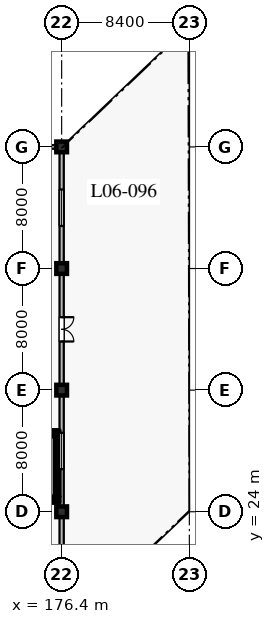
"""IFC4 building model, lengths in metres.
Left out: names, types, materials, properties, quantities, classifications, styles, units other than length and angle.
Written with IfcOpenShell. Run it as: python <this file> out.ifc"""

import sys

from ifc_helpers import new_model, si_unit, direction, frame, frame_2d, origin, origin_2d, place, context, subcontext, project, spatial, rectangle, hollow_rectangle, extrude, element, fill, save


model = new_model("IFC4")
c1 = context("Model", 3, precision=1e-05, world=origin(), true_north=direction((0.0, 1.0)))
c2 = subcontext(c1, "Body", "Model", "MODEL_VIEW")
j1 = project(units=[si_unit("LENGTHUNIT", "METRE"), si_unit("PLANEANGLEUNIT", "RADIAN")], contexts=[c1])
p1 = place(None, origin())
s1 = spatial("IfcSite", under=j1, at=p1, CompositionType="ELEMENT")
p2 = place(p1, origin())
s2 = spatial("IfcBuilding", under=s1, at=p2, CompositionType="ELEMENT")
p3 = place(p2, frame((0.0, 0.0, 28.8)))
s3 = spatial("IfcBuildingStorey", under=s2, at=p3, CompositionType="ELEMENT", Elevation=28.8)
for number, where, z_axis, x_axis in (
    (1, (176.4, 32.0, 0.0), (0.0, 0.0, 1.0), (1.0, 0.0, 0.0)),
    (2, (176.4, 48.0, 0.0), (0.0, 0.0, 1.0), (1.0, 0.0, 0.0)),
    (3, (176.4, 24.0, 0.0), (0.0, 0.0, 1.0), (1.0, 0.0, 0.0)),
    (4, (176.4, 40.0, 0.0), (0.0, 0.0, 1.0), (1.0, 0.0, 0.0)),
):
    element("IfcColumn", number, at=place(p3, frame(where, z_axis=z_axis, x_axis=x_axis)), inside=s3, PredefinedType="COLUMN", context=c2, shape_type="SweptSolid", body=[
        extrude(rectangle(XDim=0.7, YDim=0.7, at=origin_2d()), origin(), (0.0, 0.0, 1.0), 3.6),
    ])
p4 = place(p3, frame((168.35, 48.0, 0.0), z_axis=(0.0, 0.0, 1.0), x_axis=(1.0, 0.0, 0.0)))
e5 = element("IfcWall", 5, at=p4, inside=s3, PredefinedType="SOLIDWALL", context=c2, shape_type="SweptSolid", body=[
    extrude(rectangle(XDim=7.7, YDim=0.24, at=frame_2d((3.85, 0.0))), origin(), (0.0, 0.0, 1.0), 2.93),
])
p5 = place(p4, frame((0.97, 0.0, 0.8)))
e6 = element("IfcOpeningElement", 6, at=p5, cuts=e5, PredefinedType="OPENING", context=c2, shape_type="SweptSolid", body=[
    extrude(rectangle(XDim=2.0, YDim=1.75, at=frame_2d((1.0, 0.875))), frame((0.0, 0.13, 0.0), z_axis=(0.0, -1.0, 0.0), x_axis=(1.0, 0.0, 0.0)), (0.0, 0.0, 1.0), 0.26),
])
p6 = place(p4, frame((4.49, 0.0, 0.8)))
e7 = element("IfcOpeningElement", 7, at=p6, cuts=e5, PredefinedType="OPENING", context=c2, shape_type="SweptSolid", body=[
    extrude(rectangle(XDim=2.0, YDim=1.75, at=frame_2d((1.0, 0.875))), frame((0.0, 0.13, 0.0), z_axis=(0.0, -1.0, 0.0), x_axis=(1.0, 0.0, 0.0)), (0.0, 0.0, 1.0), 0.26),
])
p7 = place(p3, frame((176.4, 47.65, 0.0), z_axis=(0.0, 0.0, 1.0), x_axis=(0.0, -1.0, 0.0)))
e8 = element("IfcWall", 8, at=p7, inside=s3, PredefinedType="SOLIDWALL", context=c2, shape_type="SweptSolid", body=[
    extrude(rectangle(XDim=7.3, YDim=0.28, at=frame_2d((3.65, 0.0))), origin(), (0.0, 0.0, 1.0), 2.7),
])
p8 = place(p7, frame((2.45, 0.0, 0.5)))
e9 = element("IfcOpeningElement", 9, at=p8, cuts=e8, PredefinedType="OPENING", context=c2, shape_type="SweptSolid", body=[
    extrude(rectangle(XDim=2.4, YDim=1.65, at=frame_2d((1.2, 0.825))), frame((0.0, 0.15, 0.0), z_axis=(0.0, -1.0, 0.0), x_axis=(1.0, 0.0, 0.0)), (0.0, 0.0, 1.0), 0.3),
])
p9 = place(p3, frame((176.4, 39.65, 0.0), z_axis=(0.0, 0.0, 1.0), x_axis=(0.0, -1.0, 0.0)))
e10 = element("IfcWall", 10, at=p9, inside=s3, PredefinedType="SOLIDWALL", context=c2, shape_type="SweptSolid", body=[
    extrude(rectangle(XDim=7.3, YDim=0.28, at=frame_2d((3.65, 0.0))), origin(), (0.0, 0.0, 1.0), 2.7),
])
p10 = place(p9, frame((2.85, 0.0, 0.0)))
e11 = element("IfcOpeningElement", 11, at=p10, cuts=e10, PredefinedType="OPENING", context=c2, shape_type="SweptSolid", body=[
    extrude(rectangle(XDim=1.6, YDim=2.25, at=frame_2d((0.8, 1.125))), frame((0.0, 0.15, 0.0), z_axis=(0.0, -1.0, 0.0), x_axis=(1.0, 0.0, 0.0)), (0.0, 0.0, 1.0), 0.3),
])
p11 = place(p3, frame((176.4, 31.65, 0.0), z_axis=(0.0, 0.0, 1.0), x_axis=(0.0, -1.0, 0.0)))
e12 = element("IfcWall", 12, at=p11, inside=s3, PredefinedType="SOLIDWALL", context=c2, shape_type="SweptSolid", body=[
    extrude(rectangle(XDim=7.3, YDim=0.28, at=frame_2d((3.65, 0.0))), origin(), (0.0, 0.0, 1.0), 2.7),
])
p12 = place(p11, frame((2.45, 0.0, 0.5)))
e13 = element("IfcOpeningElement", 13, at=p12, cuts=e12, PredefinedType="OPENING", context=c2, shape_type="SweptSolid", body=[
    extrude(rectangle(XDim=2.4, YDim=1.65, at=frame_2d((1.2, 0.825))), frame((0.0, 0.15, 0.0), z_axis=(0.0, -1.0, 0.0), x_axis=(1.0, 0.0, 0.0)), (0.0, 0.0, 1.0), 0.3),
])
p13 = place(p3, frame((176.4, 23.65, 0.0), z_axis=(0.0, 0.0, 1.0), x_axis=(0.0, -1.0, 0.0)))
e14 = element("IfcWall", 14, at=p13, inside=s3, PredefinedType="SOLIDWALL", context=c2, shape_type="SweptSolid", body=[
    extrude(rectangle(XDim=7.3, YDim=0.28, at=frame_2d((3.65, 0.0))), origin(), (0.0, 0.0, 1.0), 2.7),
])
p14 = place(p13, frame((2.45, 0.0, 0.5)))
e15 = element("IfcOpeningElement", 15, at=p14, cuts=e14, PredefinedType="OPENING", context=c2, shape_type="SweptSolid", body=[
    extrude(rectangle(XDim=2.4, YDim=1.65, at=frame_2d((1.2, 0.825))), frame((0.0, 0.15, 0.0), z_axis=(0.0, -1.0, 0.0), x_axis=(1.0, 0.0, 0.0)), (0.0, 0.0, 1.0), 0.3),
])
p15 = place(p3, frame((168.1, 24.8, 0.0), z_axis=(0.0, 0.0, 1.0), x_axis=(1.0, 0.0, 0.0)))
e16 = element("IfcWall", 16, at=p15, inside=s3, PredefinedType="SHEAR", context=c2, shape_type="SweptSolid", body=[
    extrude(rectangle(XDim=8.15, YDim=0.4, at=frame_2d((4.075, 0.0))), origin(), (0.0, 0.0, 1.0), 3.365),
])
p16 = place(p3, frame((176.1, 25.005, 0.0), z_axis=(0.0, 0.0, 1.0), x_axis=(0.0, 1.0, 0.0)))
e17 = element("IfcWall", 17, at=p16, inside=s3, PredefinedType="SHEAR", context=c2, shape_type="SweptSolid", body=[
    extrude(rectangle(XDim=3.95, YDim=0.3, at=frame_2d((1.975, 0.0))), origin(), (0.0, 0.0, 1.0), 3.365),
])
p17 = place(p3, frame((168.1, 29.16, 0.0), z_axis=(0.0, 0.0, 1.0), x_axis=(1.0, 0.0, 0.0)))
e18 = element("IfcWall", 18, at=p17, inside=s3, PredefinedType="SHEAR", context=c2, shape_type="SweptSolid", body=[
    extrude(rectangle(XDim=8.15, YDim=0.4, at=frame_2d((4.075, 0.0))), origin(), (0.0, 0.0, 1.0), 3.365),
])
p18 = place(p17, frame((0.43, 0.0, 0.0)))
e19 = element("IfcOpeningElement", 19, at=p18, cuts=e18, PredefinedType="OPENING", context=c2, shape_type="SweptSolid", body=[
    extrude(rectangle(XDim=1.16, YDim=2.2, at=frame_2d((0.58, 1.1))), frame((0.0, 0.21, 0.0), z_axis=(0.0, -1.0, 0.0), x_axis=(1.0, 0.0, 0.0)), (0.0, 0.0, 1.0), 0.42),
])
for number, where, z_axis, x_axis in (
    (20, (175.92, 24.8, -1.8), (0.0, 0.0, 1.0), (1.0, 0.0, 0.0)),
    (21, (175.92, 29.16, -1.8), (0.0, 0.0, 1.0), (1.0, 0.0, 0.0)),
):
    element("IfcColumn", number, at=place(p3, frame(where, z_axis=z_axis, x_axis=x_axis)), inside=s3, PredefinedType="COLUMN", context=c2, shape_type="SweptSolid", body=[
        extrude(hollow_rectangle(XDim=0.3, YDim=0.3, WallThickness=0.012, at=origin_2d()), origin(), (0.0, 0.0, 1.0), 3.42),
    ])
p19 = place(p8, origin())
e22 = element("IfcWindow", 22, at=p19, inside=s3, PartitioningType="DOUBLE_PANEL_VERTICAL", PredefinedType="WINDOW", context=c2, shape_type="SweptSolid", body=[
    extrude(rectangle(XDim=2.4, YDim=1.65, at=frame_2d((1.2, 0.825))), frame((0.0, 0.03, 0.0), z_axis=(0.0, -1.0, 0.0), x_axis=(1.0, 0.0, 0.0)), (0.0, 0.0, 1.0), 0.06),
])
fill(e9, e22)
p20 = place(p10, origin())
e23 = element("IfcDoor", 23, at=p20, inside=s3, OperationType="DOUBLE_DOOR_SINGLE_SWING", PredefinedType="DOOR", context=c2, shape_type="SweptSolid", body=[
    extrude(rectangle(XDim=1.6, YDim=2.25, at=frame_2d((0.8, 1.125))), frame((0.0, 0.025, 0.0), z_axis=(0.0, -1.0, 0.0), x_axis=(1.0, 0.0, 0.0)), (0.0, 0.0, 1.0), 0.05),
])
fill(e11, e23)
p21 = place(p12, origin())
e24 = element("IfcWindow", 24, at=p21, inside=s3, PartitioningType="DOUBLE_PANEL_VERTICAL", PredefinedType="WINDOW", context=c2, shape_type="SweptSolid", body=[
    extrude(rectangle(XDim=2.4, YDim=1.65, at=frame_2d((1.2, 0.825))), frame((0.0, 0.03, 0.0), z_axis=(0.0, -1.0, 0.0), x_axis=(1.0, 0.0, 0.0)), (0.0, 0.0, 1.0), 0.06),
])
fill(e13, e24)
save(model, sys.argv[1])
